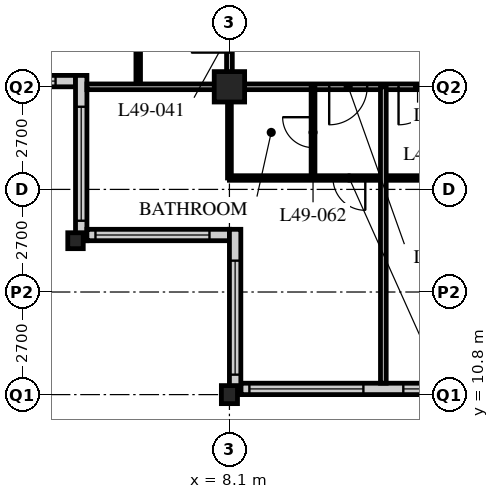
"""IFC4 building model, lengths in metres.
Left out: names, types, materials, properties, quantities, classifications, styles, units other than length and angle.
Written with IfcOpenShell. Run it as: python <this file> out.ifc"""

import sys

from ifc_helpers import new_model, si_unit, direction, frame, frame_2d, origin, origin_2d, place, context, subcontext, project, spatial, rectangle, hollow_rectangle, i_section, extrude, element, fill, save


model = new_model("IFC4")
c1 = context("Model", 3, precision=1e-05, world=origin(), true_north=direction((0.0, 1.0)))
c2 = subcontext(c1, "Body", "Model", "MODEL_VIEW")
j1 = project(units=[si_unit("LENGTHUNIT", "METRE"), si_unit("PLANEANGLEUNIT", "RADIAN")], contexts=[c1])
p1 = place(None, origin())
s1 = spatial("IfcSite", under=j1, at=p1, CompositionType="ELEMENT")
p2 = place(p1, origin())
s2 = spatial("IfcBuilding", under=s1, at=p2, CompositionType="ELEMENT")
p3 = place(p2, frame((0.0, 0.0, 192.0)))
s3 = spatial("IfcBuildingStorey", under=s2, at=p3, CompositionType="ELEMENT", Elevation=192.0)
p4 = place(p3, frame((4.05, 14.85, 0.0), z_axis=(0.0, 0.0, 1.0), x_axis=(1.0, 0.0, 0.0)))
e1 = element("IfcColumn", 1, at=p4, inside=s3, PredefinedType="COLUMN", context=c2, shape_type="SweptSolid", body=[
    extrude(i_section(OverallWidth=0.407, OverallDepth=0.419, WebThickness=0.031, FlangeThickness=0.049, FilletRadius=0.015, at=origin_2d()), origin(), (0.0, 0.0, 1.0), 3.6),
])
p5 = place(p3, frame((8.1, 10.8, 0.0), z_axis=(0.0, 0.0, 1.0), x_axis=(1.0, 0.0, 0.0)))
e2 = element("IfcColumn", 2, at=p5, inside=s3, PredefinedType="COLUMN", context=c2, shape_type="SweptSolid", body=[
    extrude(i_section(OverallWidth=0.424, OverallDepth=0.475, WebThickness=0.048, FlangeThickness=0.077, FilletRadius=0.015, at=origin_2d()), origin(), (0.0, 0.0, 1.0), 3.6),
])
p6 = place(p3, frame((8.1, 18.9, 0.0), z_axis=(0.0, 0.0, 1.0), x_axis=(1.0, 0.0, 0.0)))
e3 = element("IfcColumn", 3, at=p6, inside=s3, PredefinedType="COLUMN", context=c2, shape_type="SweptSolid", body=[
    extrude(hollow_rectangle(XDim=0.8, YDim=0.8, WallThickness=0.08, at=origin_2d()), origin(), (0.0, 0.0, 1.0), 3.6),
])
p7 = place(p3, frame((8.4, 10.95, 0.0), z_axis=(0.0, 0.0, 1.0), x_axis=(1.0, 0.0, 0.0)))
e4 = element("IfcWall", 4, at=p7, inside=s3, PredefinedType="SOLIDWALL", context=c2, shape_type="SweptSolid", body=[
    extrude(rectangle(XDim=40.2, YDim=0.3, at=frame_2d((20.1, 0.0))), origin(), (0.0, 0.0, 1.0), 3.39),
])
p8 = place(p7, frame((0.225, 0.0, 0.6)))
e5 = element("IfcOpeningElement", 5, at=p8, cuts=e4, PredefinedType="OPENING", context=c2, shape_type="SweptSolid", body=[
    extrude(rectangle(XDim=3.0, YDim=2.4, at=frame_2d((1.5, 1.2))), frame((0.0, 0.16, 0.0), z_axis=(0.0, -1.0, 0.0), x_axis=(1.0, 0.0, 0.0)), (0.0, 0.0, 1.0), 0.32),
])
p9 = place(p7, frame((4.275, 0.0, 0.6)))
e6 = element("IfcOpeningElement", 6, at=p9, cuts=e4, PredefinedType="OPENING", context=c2, shape_type="SweptSolid", body=[
    extrude(rectangle(XDim=3.0, YDim=2.4, at=frame_2d((1.5, 1.2))), frame((0.0, 0.16, 0.0), z_axis=(0.0, -1.0, 0.0), x_axis=(1.0, 0.0, 0.0)), (0.0, 0.0, 1.0), 0.32),
])
p10 = place(p7, frame((8.325, 0.0, 0.6)))
e7 = element("IfcOpeningElement", 7, at=p10, cuts=e4, PredefinedType="OPENING", context=c2, shape_type="SweptSolid", body=[
    extrude(rectangle(XDim=3.0, YDim=2.4, at=frame_2d((1.5, 1.2))), frame((0.0, 0.16, 0.0), z_axis=(0.0, -1.0, 0.0), x_axis=(1.0, 0.0, 0.0)), (0.0, 0.0, 1.0), 0.32),
])
p11 = place(p7, frame((12.375, 0.0, 0.6)))
e8 = element("IfcOpeningElement", 8, at=p11, cuts=e4, PredefinedType="OPENING", context=c2, shape_type="SweptSolid", body=[
    extrude(rectangle(XDim=3.0, YDim=2.4, at=frame_2d((1.5, 1.2))), frame((0.0, 0.16, 0.0), z_axis=(0.0, -1.0, 0.0), x_axis=(1.0, 0.0, 0.0)), (0.0, 0.0, 1.0), 0.32),
])
p12 = place(p7, frame((16.425, 0.0, 0.6)))
e9 = element("IfcOpeningElement", 9, at=p12, cuts=e4, PredefinedType="OPENING", context=c2, shape_type="SweptSolid", body=[
    extrude(rectangle(XDim=3.0, YDim=2.4, at=frame_2d((1.5, 1.2))), frame((0.0, 0.16, 0.0), z_axis=(0.0, -1.0, 0.0), x_axis=(1.0, 0.0, 0.0)), (0.0, 0.0, 1.0), 0.32),
])
p13 = place(p7, frame((20.475, 0.0, 0.6)))
e10 = element("IfcOpeningElement", 10, at=p13, cuts=e4, PredefinedType="OPENING", context=c2, shape_type="SweptSolid", body=[
    extrude(rectangle(XDim=3.0, YDim=2.4, at=frame_2d((1.5, 1.2))), frame((0.0, 0.16, 0.0), z_axis=(0.0, -1.0, 0.0), x_axis=(1.0, 0.0, 0.0)), (0.0, 0.0, 1.0), 0.32),
])
p14 = place(p7, frame((24.525, 0.0, 0.6)))
e11 = element("IfcOpeningElement", 11, at=p14, cuts=e4, PredefinedType="OPENING", context=c2, shape_type="SweptSolid", body=[
    extrude(rectangle(XDim=3.0, YDim=2.4, at=frame_2d((1.5, 1.2))), frame((0.0, 0.16, 0.0), z_axis=(0.0, -1.0, 0.0), x_axis=(1.0, 0.0, 0.0)), (0.0, 0.0, 1.0), 0.32),
])
p15 = place(p7, frame((28.575, 0.0, 0.6)))
e12 = element("IfcOpeningElement", 12, at=p15, cuts=e4, PredefinedType="OPENING", context=c2, shape_type="SweptSolid", body=[
    extrude(rectangle(XDim=3.0, YDim=2.4, at=frame_2d((1.5, 1.2))), frame((0.0, 0.16, 0.0), z_axis=(0.0, -1.0, 0.0), x_axis=(1.0, 0.0, 0.0)), (0.0, 0.0, 1.0), 0.32),
])
p16 = place(p7, frame((32.625, 0.0, 0.6)))
e13 = element("IfcOpeningElement", 13, at=p16, cuts=e4, PredefinedType="OPENING", context=c2, shape_type="SweptSolid", body=[
    extrude(rectangle(XDim=3.0, YDim=2.4, at=frame_2d((1.5, 1.2))), frame((0.0, 0.16, 0.0), z_axis=(0.0, -1.0, 0.0), x_axis=(1.0, 0.0, 0.0)), (0.0, 0.0, 1.0), 0.32),
])
p17 = place(p7, frame((36.675, 0.0, 0.6)))
e14 = element("IfcOpeningElement", 14, at=p17, cuts=e4, PredefinedType="OPENING", context=c2, shape_type="SweptSolid", body=[
    extrude(rectangle(XDim=3.0, YDim=2.4, at=frame_2d((1.5, 1.2))), frame((0.0, 0.16, 0.0), z_axis=(0.0, -1.0, 0.0), x_axis=(1.0, 0.0, 0.0)), (0.0, 0.0, 1.0), 0.32),
])
p18 = place(p3, frame((0.3, 19.05, 0.0), z_axis=(0.0, 0.0, 1.0), x_axis=(1.0, 0.0, 0.0)))
e15 = element("IfcWall", 15, at=p18, inside=s3, PredefinedType="SOLIDWALL", context=c2, shape_type="SweptSolid", body=[
    extrude(rectangle(XDim=3.75, YDim=0.3, at=frame_2d((1.875, 0.0))), origin(), (0.0, 0.0, 1.0), 3.39),
])
p19 = place(p18, frame((0.225, 0.0, 0.6)))
e16 = element("IfcOpeningElement", 16, at=p19, cuts=e15, PredefinedType="OPENING", context=c2, shape_type="SweptSolid", body=[
    extrude(rectangle(XDim=3.0, YDim=2.0, at=frame_2d((1.5, 1.0))), frame((0.0, 0.16, 0.0), z_axis=(0.0, -1.0, 0.0), x_axis=(1.0, 0.0, 0.0)), (0.0, 0.0, 1.0), 0.32),
])
p20 = place(p3, frame((4.2, 19.2, 0.0), z_axis=(0.0, 0.0, 1.0), x_axis=(0.0, -1.0, 0.0)))
e17 = element("IfcWall", 17, at=p20, inside=s3, PredefinedType="SOLIDWALL", context=c2, shape_type="SweptSolid", body=[
    extrude(rectangle(XDim=4.35, YDim=0.3, at=frame_2d((2.175, 0.0))), origin(), (0.0, 0.0, 1.0), 3.39),
])
p21 = place(p20, frame((0.825, 0.0, 0.6)))
e18 = element("IfcOpeningElement", 18, at=p21, cuts=e17, PredefinedType="OPENING", context=c2, shape_type="SweptSolid", body=[
    extrude(rectangle(XDim=3.0, YDim=2.0, at=frame_2d((1.5, 1.0))), frame((0.0, 0.16, 0.0), z_axis=(0.0, -1.0, 0.0), x_axis=(1.0, 0.0, 0.0)), (0.0, 0.0, 1.0), 0.32),
])
p22 = place(p3, frame((4.35, 15.0, 0.0), z_axis=(0.0, 0.0, 1.0), x_axis=(1.0, 0.0, 0.0)))
e19 = element("IfcWall", 19, at=p22, inside=s3, PredefinedType="SOLIDWALL", context=c2, shape_type="SweptSolid", body=[
    extrude(rectangle(XDim=3.75, YDim=0.3, at=frame_2d((1.875, 0.0))), origin(), (0.0, 0.0, 1.0), 3.39),
])
p23 = place(p22, frame((0.225, 0.0, 0.6)))
e20 = element("IfcOpeningElement", 20, at=p23, cuts=e19, PredefinedType="OPENING", context=c2, shape_type="SweptSolid", body=[
    extrude(rectangle(XDim=3.0, YDim=2.0, at=frame_2d((1.5, 1.0))), frame((0.0, 0.16, 0.0), z_axis=(0.0, -1.0, 0.0), x_axis=(1.0, 0.0, 0.0)), (0.0, 0.0, 1.0), 0.32),
])
p24 = place(p3, frame((8.25, 15.15, 0.0), z_axis=(0.0, 0.0, 1.0), x_axis=(0.0, -1.0, 0.0)))
e21 = element("IfcWall", 21, at=p24, inside=s3, PredefinedType="SOLIDWALL", context=c2, shape_type="SweptSolid", body=[
    extrude(rectangle(XDim=4.35, YDim=0.3, at=frame_2d((2.175, 0.0))), origin(), (0.0, 0.0, 1.0), 3.39),
])
p25 = place(p24, frame((0.825, 0.0, 0.6)))
e22 = element("IfcOpeningElement", 22, at=p25, cuts=e21, PredefinedType="OPENING", context=c2, shape_type="SweptSolid", body=[
    extrude(rectangle(XDim=3.0, YDim=2.0, at=frame_2d((1.5, 1.0))), frame((0.0, 0.16, 0.0), z_axis=(0.0, -1.0, 0.0), x_axis=(1.0, 0.0, 0.0)), (0.0, 0.0, 1.0), 0.32),
])
p26 = place(p3, frame((8.1, 18.9, 0.0), z_axis=(0.0, 0.0, 1.0), x_axis=(1.0, 0.0, 0.0)))
e23 = element("IfcWall", 23, at=p26, inside=s3, PredefinedType="PARTITIONING", context=c2, shape_type="SweptSolid", body=[
    extrude(rectangle(XDim=40.5, YDim=0.15, at=frame_2d((20.25, 0.0))), origin(), (0.0, 0.0, 1.0), 2.778),
])
p27 = place(p26, frame((4.45, 0.0, 0.0)))
e24 = element("IfcOpeningElement", 24, at=p27, cuts=e23, PredefinedType="OPENING", context=c2, shape_type="SweptSolid", body=[
    extrude(rectangle(XDim=1.0, YDim=2.1, at=frame_2d((0.5, 1.05))), frame((0.0, 0.085, 0.0), z_axis=(0.0, -1.0, 0.0), x_axis=(1.0, 0.0, 0.0)), (0.0, 0.0, 1.0), 0.17),
])
p28 = place(p26, frame((17.1, 0.0, 0.0)))
e25 = element("IfcOpeningElement", 25, at=p28, cuts=e23, PredefinedType="OPENING", context=c2, shape_type="SweptSolid", body=[
    extrude(rectangle(XDim=1.0, YDim=2.1, at=frame_2d((0.5, 1.05))), frame((0.0, 0.085, 0.0), z_axis=(0.0, -1.0, 0.0), x_axis=(1.0, 0.0, 0.0)), (0.0, 0.0, 1.0), 0.17),
])
p29 = place(p26, frame((28.75, 0.0, 0.0)))
e26 = element("IfcOpeningElement", 26, at=p29, cuts=e23, PredefinedType="OPENING", context=c2, shape_type="SweptSolid", body=[
    extrude(rectangle(XDim=1.0, YDim=2.1, at=frame_2d((0.5, 1.05))), frame((0.0, 0.085, 0.0), z_axis=(0.0, -1.0, 0.0), x_axis=(1.0, 0.0, 0.0)), (0.0, 0.0, 1.0), 0.17),
])
p30 = place(p26, frame((2.625, 0.0, 0.0)))
e27 = element("IfcOpeningElement", 27, at=p30, cuts=e23, PredefinedType="OPENING", context=c2, shape_type="SweptSolid", body=[
    extrude(rectangle(XDim=1.0, YDim=2.1, at=frame_2d((0.5, 1.05))), frame((0.0, 0.085, 0.0), z_axis=(0.0, -1.0, 0.0), x_axis=(1.0, 0.0, 0.0)), (0.0, 0.0, 1.0), 0.17),
])
p31 = place(p26, frame((36.875, 0.0, 0.0)))
e28 = element("IfcOpeningElement", 28, at=p31, cuts=e23, PredefinedType="OPENING", context=c2, shape_type="SweptSolid", body=[
    extrude(rectangle(XDim=1.0, YDim=2.1, at=frame_2d((0.5, 1.05))), frame((0.0, 0.085, 0.0), z_axis=(0.0, -1.0, 0.0), x_axis=(1.0, 0.0, 0.0)), (0.0, 0.0, 1.0), 0.17),
])
p32 = place(p3, frame((8.1, 18.9, 0.0), z_axis=(0.0, 0.0, 1.0), x_axis=(0.0, 1.0, 0.0)))
e29 = element("IfcWall", 29, at=p32, inside=s3, PredefinedType="PARTITIONING", context=c2, shape_type="SweptSolid", body=[
    extrude(rectangle(XDim=24.3, YDim=0.15, at=frame_2d((12.15, 0.0))), origin(), (0.0, 0.0, 1.0), 2.778),
])
p33 = place(p32, frame((0.9, 0.0, 0.0)))
e30 = element("IfcOpeningElement", 30, at=p33, cuts=e29, PredefinedType="OPENING", context=c2, shape_type="SweptSolid", body=[
    extrude(rectangle(XDim=1.0, YDim=2.1, at=frame_2d((0.5, 1.05))), frame((0.0, 0.085, 0.0), z_axis=(0.0, -1.0, 0.0), x_axis=(1.0, 0.0, 0.0)), (0.0, 0.0, 1.0), 0.17),
])
p34 = place(p32, frame((9.0, 0.0, 0.0)))
e31 = element("IfcOpeningElement", 31, at=p34, cuts=e29, PredefinedType="OPENING", context=c2, shape_type="SweptSolid", body=[
    extrude(rectangle(XDim=1.0, YDim=2.1, at=frame_2d((0.5, 1.05))), frame((0.0, 0.085, 0.0), z_axis=(0.0, -1.0, 0.0), x_axis=(1.0, 0.0, 0.0)), (0.0, 0.0, 1.0), 0.17),
])
p35 = place(p32, frame((17.1, 0.0, 0.0)))
e32 = element("IfcOpeningElement", 32, at=p35, cuts=e29, PredefinedType="OPENING", context=c2, shape_type="SweptSolid", body=[
    extrude(rectangle(XDim=1.0, YDim=2.1, at=frame_2d((0.5, 1.05))), frame((0.0, 0.085, 0.0), z_axis=(0.0, -1.0, 0.0), x_axis=(1.0, 0.0, 0.0)), (0.0, 0.0, 1.0), 0.17),
])
p36 = place(p3, frame((5.7, 18.9, 0.0), z_axis=(0.0, 0.0, 1.0), x_axis=(0.0, 1.0, 0.0)))
e33 = element("IfcWall", 33, at=p36, inside=s3, PredefinedType="PARTITIONING", context=c2, shape_type="SweptSolid", body=[
    extrude(rectangle(XDim=24.3, YDim=0.12, at=frame_2d((12.15, 0.0))), origin(), (0.0, 0.0, 1.0), 3.39),
])
p37 = place(p36, frame((0.975, 0.0, 0.0)))
e34 = element("IfcOpeningElement", 34, at=p37, cuts=e33, PredefinedType="OPENING", context=c2, shape_type="SweptSolid", body=[
    extrude(rectangle(XDim=0.85, YDim=2.1, at=frame_2d((0.425, 1.05))), frame((0.0, 0.07, 0.0), z_axis=(0.0, -1.0, 0.0), x_axis=(1.0, 0.0, 0.0)), (0.0, 0.0, 1.0), 0.14),
])
p38 = place(p36, frame((4.375, 0.0, 0.0)))
e35 = element("IfcOpeningElement", 35, at=p38, cuts=e33, PredefinedType="OPENING", context=c2, shape_type="SweptSolid", body=[
    extrude(rectangle(XDim=0.85, YDim=2.1, at=frame_2d((0.425, 1.05))), frame((0.0, 0.07, 0.0), z_axis=(0.0, -1.0, 0.0), x_axis=(1.0, 0.0, 0.0)), (0.0, 0.0, 1.0), 0.14),
])
p39 = place(p36, frame((9.075, 0.0, 0.0)))
e36 = element("IfcOpeningElement", 36, at=p39, cuts=e33, PredefinedType="OPENING", context=c2, shape_type="SweptSolid", body=[
    extrude(rectangle(XDim=0.85, YDim=2.1, at=frame_2d((0.425, 1.05))), frame((0.0, 0.07, 0.0), z_axis=(0.0, -1.0, 0.0), x_axis=(1.0, 0.0, 0.0)), (0.0, 0.0, 1.0), 0.14),
])
p40 = place(p36, frame((12.475, 0.0, 0.0)))
e37 = element("IfcOpeningElement", 37, at=p40, cuts=e33, PredefinedType="OPENING", context=c2, shape_type="SweptSolid", body=[
    extrude(rectangle(XDim=0.85, YDim=2.1, at=frame_2d((0.425, 1.05))), frame((0.0, 0.07, 0.0), z_axis=(0.0, -1.0, 0.0), x_axis=(1.0, 0.0, 0.0)), (0.0, 0.0, 1.0), 0.14),
])
p41 = place(p36, frame((17.175, 0.0, 0.0)))
e38 = element("IfcOpeningElement", 38, at=p41, cuts=e33, PredefinedType="OPENING", context=c2, shape_type="SweptSolid", body=[
    extrude(rectangle(XDim=0.85, YDim=2.1, at=frame_2d((0.425, 1.05))), frame((0.0, 0.07, 0.0), z_axis=(0.0, -1.0, 0.0), x_axis=(1.0, 0.0, 0.0)), (0.0, 0.0, 1.0), 0.14),
])
p42 = place(p36, frame((20.575, 0.0, 0.0)))
e39 = element("IfcOpeningElement", 39, at=p42, cuts=e33, PredefinedType="OPENING", context=c2, shape_type="SweptSolid", body=[
    extrude(rectangle(XDim=0.85, YDim=2.1, at=frame_2d((0.425, 1.05))), frame((0.0, 0.07, 0.0), z_axis=(0.0, -1.0, 0.0), x_axis=(1.0, 0.0, 0.0)), (0.0, 0.0, 1.0), 0.14),
])
p43 = place(p3, frame((8.1, 16.5, 0.0), z_axis=(0.0, 0.0, 1.0), x_axis=(1.0, 0.0, 0.0)))
e40 = element("IfcWall", 40, at=p43, inside=s3, PredefinedType="PARTITIONING", context=c2, shape_type="SweptSolid", body=[
    extrude(rectangle(XDim=40.5, YDim=0.12, at=frame_2d((20.25, 0.0))), origin(), (0.0, 0.0, 1.0), 3.39),
])
p44 = place(p43, frame((5.025, 0.0, 0.0)))
e41 = element("IfcOpeningElement", 41, at=p44, cuts=e40, PredefinedType="OPENING", context=c2, shape_type="SweptSolid", body=[
    extrude(rectangle(XDim=0.85, YDim=2.1, at=frame_2d((0.425, 1.05))), frame((0.0, 0.07, 0.0), z_axis=(0.0, -1.0, 0.0), x_axis=(1.0, 0.0, 0.0)), (0.0, 0.0, 1.0), 0.14),
])
p45 = place(p43, frame((12.475, 0.0, 0.0)))
e42 = element("IfcOpeningElement", 42, at=p45, cuts=e40, PredefinedType="OPENING", context=c2, shape_type="SweptSolid", body=[
    extrude(rectangle(XDim=0.85, YDim=2.1, at=frame_2d((0.425, 1.05))), frame((0.0, 0.07, 0.0), z_axis=(0.0, -1.0, 0.0), x_axis=(1.0, 0.0, 0.0)), (0.0, 0.0, 1.0), 0.14),
])
p46 = place(p43, frame((17.175, 0.0, 0.0)))
e43 = element("IfcOpeningElement", 43, at=p46, cuts=e40, PredefinedType="OPENING", context=c2, shape_type="SweptSolid", body=[
    extrude(rectangle(XDim=0.85, YDim=2.1, at=frame_2d((0.425, 1.05))), frame((0.0, 0.07, 0.0), z_axis=(0.0, -1.0, 0.0), x_axis=(1.0, 0.0, 0.0)), (0.0, 0.0, 1.0), 0.14),
])
p47 = place(p43, frame((24.625, 0.0, 0.0)))
e44 = element("IfcOpeningElement", 44, at=p47, cuts=e40, PredefinedType="OPENING", context=c2, shape_type="SweptSolid", body=[
    extrude(rectangle(XDim=0.85, YDim=2.1, at=frame_2d((0.425, 1.05))), frame((0.0, 0.07, 0.0), z_axis=(0.0, -1.0, 0.0), x_axis=(1.0, 0.0, 0.0)), (0.0, 0.0, 1.0), 0.14),
])
p48 = place(p43, frame((29.325, 0.0, 0.0)))
e45 = element("IfcOpeningElement", 45, at=p48, cuts=e40, PredefinedType="OPENING", context=c2, shape_type="SweptSolid", body=[
    extrude(rectangle(XDim=0.85, YDim=2.1, at=frame_2d((0.425, 1.05))), frame((0.0, 0.07, 0.0), z_axis=(0.0, -1.0, 0.0), x_axis=(1.0, 0.0, 0.0)), (0.0, 0.0, 1.0), 0.14),
])
p49 = place(p43, frame((32.725, 0.0, 0.0)))
e46 = element("IfcOpeningElement", 46, at=p49, cuts=e40, PredefinedType="OPENING", context=c2, shape_type="SweptSolid", body=[
    extrude(rectangle(XDim=0.85, YDim=2.1, at=frame_2d((0.425, 1.05))), frame((0.0, 0.07, 0.0), z_axis=(0.0, -1.0, 0.0), x_axis=(1.0, 0.0, 0.0)), (0.0, 0.0, 1.0), 0.14),
])
p50 = place(p43, frame((2.725, 0.0, 0.0)))
e47 = element("IfcOpeningElement", 47, at=p50, cuts=e40, PredefinedType="OPENING", context=c2, shape_type="SweptSolid", body=[
    extrude(rectangle(XDim=0.85, YDim=2.1, at=frame_2d((0.425, 1.05))), frame((0.0, 0.07, 0.0), z_axis=(0.0, -1.0, 0.0), x_axis=(1.0, 0.0, 0.0)), (0.0, 0.0, 1.0), 0.14),
])
p51 = place(p43, frame((36.925, 0.0, 0.0)))
e48 = element("IfcOpeningElement", 48, at=p51, cuts=e40, PredefinedType="OPENING", context=c2, shape_type="SweptSolid", body=[
    extrude(rectangle(XDim=0.85, YDim=2.1, at=frame_2d((0.425, 1.05))), frame((0.0, 0.07, 0.0), z_axis=(0.0, -1.0, 0.0), x_axis=(1.0, 0.0, 0.0)), (0.0, 0.0, 1.0), 0.14),
])
p52 = place(p3, frame((10.3, 18.9, 0.0), z_axis=(0.0, 0.0, 1.0), x_axis=(0.0, -1.0, 0.0)))
e49 = element("IfcWall", 49, at=p52, inside=s3, PredefinedType="PARTITIONING", context=c2, shape_type="SweptSolid", body=[
    extrude(rectangle(XDim=2.4, YDim=0.1, at=frame_2d((1.2, 0.0))), origin(), (0.0, 0.0, 1.0), 3.39),
])
p53 = place(p52, frame((0.8, 0.0, 0.0)))
e50 = element("IfcOpeningElement", 50, at=p53, cuts=e49, PredefinedType="OPENING", context=c2, shape_type="SweptSolid", body=[
    extrude(rectangle(XDim=0.8, YDim=2.1, at=frame_2d((0.4, 1.05))), frame((0.0, 0.06, 0.0), z_axis=(0.0, -1.0, 0.0), x_axis=(1.0, 0.0, 0.0)), (0.0, 0.0, 1.0), 0.12),
])
p54 = place(p3, frame((8.1, 18.9, 0.0), z_axis=(0.0, 0.0, 1.0), x_axis=(0.0, -1.0, 0.0)))
e51 = element("IfcWall", 51, at=p54, inside=s3, PredefinedType="PARTITIONING", context=c2, shape_type="SweptSolid", body=[
    extrude(rectangle(XDim=2.4, YDim=0.1, at=frame_2d((1.2, 0.0))), origin(), (0.0, 0.0, 1.0), 2.778),
])
p55 = place(p3, frame((4.35, 18.9, 0.0), z_axis=(0.0, 0.0, 1.0), x_axis=(1.0, 0.0, 0.0)))
e52 = element("IfcWall", 52, at=p55, inside=s3, PredefinedType="PARTITIONING", context=c2, shape_type="SweptSolid", body=[
    extrude(rectangle(XDim=3.75, YDim=0.15, at=frame_2d((1.875, 0.0))), origin(), (0.0, 0.0, 1.0), 2.778),
])
p56 = place(p3, frame((12.15, 18.9, 0.0), z_axis=(0.0, 0.0, 1.0), x_axis=(0.0, -1.0, 0.0)))
e53 = element("IfcWall", 53, at=p56, inside=s3, PredefinedType="PARTITIONING", context=c2, shape_type="SweptSolid", body=[
    extrude(rectangle(XDim=7.8, YDim=0.15, at=frame_2d((3.9, 0.0))), origin(), (0.0, 0.0, 1.0), 3.39),
])
p57 = place(p8, origin())
e54 = element("IfcWindow", 54, at=p57, inside=s3, PartitioningType="SINGLE_PANEL", PredefinedType="WINDOW", context=c2, shape_type="SweptSolid", body=[
    extrude(rectangle(XDim=3.0, YDim=2.4, at=frame_2d((1.5, 1.2))), frame((0.0, 0.03, 0.0), z_axis=(0.0, -1.0, 0.0), x_axis=(1.0, 0.0, 0.0)), (0.0, 0.0, 1.0), 0.06),
])
fill(e5, e54)
p58 = place(p9, origin())
e55 = element("IfcWindow", 55, at=p58, inside=s3, PartitioningType="SINGLE_PANEL", PredefinedType="WINDOW", context=c2, shape_type="SweptSolid", body=[
    extrude(rectangle(XDim=3.0, YDim=2.4, at=frame_2d((1.5, 1.2))), frame((0.0, 0.03, 0.0), z_axis=(0.0, -1.0, 0.0), x_axis=(1.0, 0.0, 0.0)), (0.0, 0.0, 1.0), 0.06),
])
fill(e6, e55)
p59 = place(p19, origin())
e56 = element("IfcWindow", 56, at=p59, inside=s3, PartitioningType="SINGLE_PANEL", PredefinedType="WINDOW", context=c2, shape_type="SweptSolid", body=[
    extrude(rectangle(XDim=3.0, YDim=2.0, at=frame_2d((1.5, 1.0))), frame((0.0, 0.03, 0.0), z_axis=(0.0, -1.0, 0.0), x_axis=(1.0, 0.0, 0.0)), (0.0, 0.0, 1.0), 0.06),
])
fill(e16, e56)
p60 = place(p21, origin())
e57 = element("IfcWindow", 57, at=p60, inside=s3, PartitioningType="SINGLE_PANEL", PredefinedType="WINDOW", context=c2, shape_type="SweptSolid", body=[
    extrude(rectangle(XDim=3.0, YDim=2.0, at=frame_2d((1.5, 1.0))), frame((0.0, 0.03, 0.0), z_axis=(0.0, -1.0, 0.0), x_axis=(1.0, 0.0, 0.0)), (0.0, 0.0, 1.0), 0.06),
])
fill(e18, e57)
p61 = place(p23, origin())
e58 = element("IfcWindow", 58, at=p61, inside=s3, PartitioningType="SINGLE_PANEL", PredefinedType="WINDOW", context=c2, shape_type="SweptSolid", body=[
    extrude(rectangle(XDim=3.0, YDim=2.0, at=frame_2d((1.5, 1.0))), frame((0.0, 0.03, 0.0), z_axis=(0.0, -1.0, 0.0), x_axis=(1.0, 0.0, 0.0)), (0.0, 0.0, 1.0), 0.06),
])
fill(e20, e58)
p62 = place(p25, origin())
e59 = element("IfcWindow", 59, at=p62, inside=s3, PartitioningType="SINGLE_PANEL", PredefinedType="WINDOW", context=c2, shape_type="SweptSolid", body=[
    extrude(rectangle(XDim=3.0, YDim=2.0, at=frame_2d((1.5, 1.0))), frame((0.0, 0.03, 0.0), z_axis=(0.0, -1.0, 0.0), x_axis=(1.0, 0.0, 0.0)), (0.0, 0.0, 1.0), 0.06),
])
fill(e22, e59)
p63 = place(p27, origin())
e60 = element("IfcDoor", 60, at=p63, inside=s3, OperationType="SINGLE_SWING_RIGHT", PredefinedType="DOOR", context=c2, shape_type="SweptSolid", body=[
    extrude(rectangle(XDim=1.0, YDim=2.1, at=frame_2d((0.5, 1.05))), frame((0.0, 0.025, 0.0), z_axis=(0.0, -1.0, 0.0), x_axis=(1.0, 0.0, 0.0)), (0.0, 0.0, 1.0), 0.05),
])
fill(e24, e60)
p64 = place(p33, origin())
e61 = element("IfcDoor", 61, at=p64, inside=s3, OperationType="SINGLE_SWING_LEFT", PredefinedType="DOOR", context=c2, shape_type="SweptSolid", body=[
    extrude(rectangle(XDim=1.0, YDim=2.1, at=frame_2d((0.5, 1.05))), frame((0.0, 0.025, 0.0), z_axis=(0.0, -1.0, 0.0), x_axis=(1.0, 0.0, 0.0)), (0.0, 0.0, 1.0), 0.05),
])
fill(e30, e61)
p65 = place(p53, origin())
e62 = element("IfcDoor", 62, at=p65, inside=s3, OperationType="SINGLE_SWING_RIGHT", PredefinedType="DOOR", context=c2, shape_type="SweptSolid", body=[
    extrude(rectangle(XDim=0.8, YDim=2.1, at=frame_2d((0.4, 1.05))), frame((0.0, 0.025, 0.0), z_axis=(0.0, -1.0, 0.0), x_axis=(1.0, 0.0, 0.0)), (0.0, 0.0, 1.0), 0.05),
])
fill(e50, e62)
p66 = place(p30, origin())
e63 = element("IfcDoor", 63, at=p66, inside=s3, OperationType="SINGLE_SWING_RIGHT", PredefinedType="DOOR", context=c2, shape_type="SweptSolid", body=[
    extrude(rectangle(XDim=1.0, YDim=2.1, at=frame_2d((0.5, 1.05))), frame((0.0, 0.025, 0.0), z_axis=(0.0, -1.0, 0.0), x_axis=(1.0, 0.0, 0.0)), (0.0, 0.0, 1.0), 0.05),
])
fill(e27, e63)
p67 = place(p50, origin())
e64 = element("IfcDoor", 64, at=p67, inside=s3, OperationType="SINGLE_SWING_LEFT", PredefinedType="DOOR", context=c2, shape_type="SweptSolid", body=[
    extrude(rectangle(XDim=0.85, YDim=2.1, at=frame_2d((0.425, 1.05))), frame((0.0, 0.025, 0.0), z_axis=(0.0, -1.0, 0.0), x_axis=(1.0, 0.0, 0.0)), (0.0, 0.0, 1.0), 0.05),
])
fill(e47, e64)
save(model, sys.argv[1])
